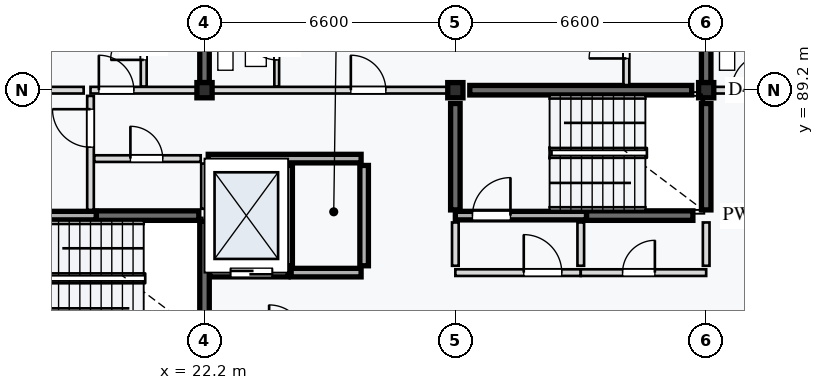
"""IFC4 building model, lengths in metres.
Left out: names, types, materials, properties, quantities, classifications, styles, units other than length and angle.
Written with IfcOpenShell. Run it as: python <this file> out.ifc"""

import sys

from ifc_helpers import new_model, si_unit, direction, frame, frame_2d, origin, origin_2d, place, context, subcontext, project, spatial, rectangle, extrude, element, fill, save


model = new_model("IFC4")
c1 = context("Model", 3, precision=1e-05, world=origin(), true_north=direction((0.0, 1.0)))
c2 = subcontext(c1, "Body", "Model", "MODEL_VIEW")
j1 = project(units=[si_unit("LENGTHUNIT", "METRE"), si_unit("PLANEANGLEUNIT", "RADIAN")], contexts=[c1])
p1 = place(None, origin())
s1 = spatial("IfcSite", under=j1, at=p1, CompositionType="ELEMENT")
p2 = place(p1, origin())
s2 = spatial("IfcBuilding", under=s1, at=p2, CompositionType="ELEMENT")
p3 = place(p2, frame((0.0, 0.0, 46.8)))
s3 = spatial("IfcBuildingStorey", under=s2, at=p3, CompositionType="ELEMENT", Elevation=46.8)
for number, where, z_axis, x_axis in (
    (1, (22.2, 89.2, 0.0), (0.0, 0.0, 1.0), (1.0, 0.0, 0.0)),
    (2, (28.8, 89.2, 0.0), (0.0, 0.0, 1.0), (1.0, 0.0, 0.0)),
    (3, (35.4, 89.2, 0.0), (0.0, 0.0, 1.0), (1.0, 0.0, 0.0)),
):
    element("IfcColumn", number, at=place(p3, frame(where, z_axis=z_axis, x_axis=x_axis)), inside=s3, PredefinedType="COLUMN", context=c2, shape_type="SweptSolid", body=[
        extrude(rectangle(XDim=0.4, YDim=0.4, at=origin_2d()), origin(), (0.0, 0.0, 1.0), 3.2),
    ])
p4 = place(p3, frame((19.35, 85.9, 0.0), z_axis=(0.0, 0.0, 1.0), x_axis=(1.0, 0.0, 0.0)))
e4 = element("IfcWall", 4, at=p4, inside=s3, PredefinedType="SHEAR", context=c2, shape_type="SweptSolid", body=[
    extrude(rectangle(XDim=2.7, YDim=0.25, at=frame_2d((1.35, 0.0))), origin(), (0.0, 0.0, 1.0), 2.98),
])
p5 = place(p3, frame((22.2, 82.95, 0.0), z_axis=(0.0, 0.0, 1.0), x_axis=(0.0, 1.0, 0.0)))
e5 = element("IfcWall", 5, at=p5, inside=s3, PredefinedType="SHEAR", context=c2, shape_type="SweptSolid", body=[
    extrude(rectangle(XDim=2.8, YDim=0.25, at=frame_2d((1.4, 0.0))), origin(), (0.0, 0.0, 1.0), 2.98),
])
p6 = place(p3, frame((29.18, 89.2, 0.0), z_axis=(0.0, 0.0, 1.0), x_axis=(1.0, 0.0, 0.0)))
e6 = element("IfcWall", 6, at=p6, inside=s3, PredefinedType="SHEAR", context=c2, shape_type="SweptSolid", body=[
    extrude(rectangle(XDim=5.84, YDim=0.25, at=frame_2d((2.92, 0.0))), origin(), (0.0, 0.0, 1.0), 2.98),
])
for number, where, z_axis, x_axis in (
    (7, (32.25, 85.9, 0.0), (0.0, 0.0, 1.0), (1.0, 0.0, 0.0)),
    (8, (28.8, 86.05, 0.0), (0.0, 0.0, 1.0), (0.0, 1.0, 0.0)),
    (9, (35.4, 86.05, 0.0), (0.0, 0.0, 1.0), (0.0, 1.0, 0.0)),
):
    element("IfcWall", number, at=place(p3, frame(where, z_axis=z_axis, x_axis=x_axis)), inside=s3, PredefinedType="SHEAR", context=c2, shape_type="SweptSolid", body=[
        extrude(rectangle(XDim=2.8, YDim=0.25, at=frame_2d((1.4, 0.0))), origin(), (0.0, 0.0, 1.0), 2.98),
    ])
for number, where, z_axis, x_axis in (
    (10, (22.2, 89.4, 0.0), (0.0, 0.0, 1.0), (0.0, 1.0, 0.0)),
    (11, (35.4, 89.4, 0.0), (0.0, 0.0, 1.0), (0.0, 1.0, 0.0)),
):
    element("IfcWall", number, at=place(p3, frame(where, z_axis=z_axis, x_axis=x_axis)), inside=s3, PredefinedType="SHEAR", context=c2, shape_type="SweptSolid", body=[
        extrude(rectangle(XDim=6.2, YDim=0.25, at=frame_2d((3.1, 0.0))), origin(), (0.0, 0.0, 1.0), 2.98),
    ])
p7 = place(p3, frame((15.75, 85.9, 0.0), z_axis=(0.0, 0.0, 1.0), x_axis=(1.0, 0.0, 0.0)))
e12 = element("IfcWall", 12, at=p7, inside=s3, PredefinedType="STANDARD", context=c2, shape_type="SweptSolid", body=[
    extrude(rectangle(XDim=3.6, YDim=0.225, at=frame_2d((1.8, 0.0))), origin(), (0.0, 0.0, 1.0), 2.98),
])
p8 = place(p7, frame((0.45, 0.0, 0.0)))
e13 = element("IfcOpeningElement", 13, at=p8, cuts=e12, PredefinedType="OPENING", context=c2, shape_type="SweptSolid", body=[
    extrude(rectangle(XDim=1.04, YDim=2.12, at=frame_2d((0.52, 1.06))), frame((0.0, 0.123, 0.0), z_axis=(0.0, -1.0, 0.0), x_axis=(1.0, 0.0, 0.0)), (0.0, 0.0, 1.0), 0.245),
])
p9 = place(p3, frame((19.2, 86.05, 0.0), z_axis=(0.0, 0.0, 1.0), x_axis=(0.0, 1.0, 0.0)))
e14 = element("IfcWall", 14, at=p9, inside=s3, PredefinedType="PARTITIONING", context=c2, shape_type="SweptSolid", body=[
    extrude(rectangle(XDim=3.0, YDim=0.175, at=frame_2d((1.5, 0.0))), origin(), (0.0, 0.0, 1.0), 2.98),
])
p10 = place(p9, frame((1.65, 0.0, 0.0)))
e15 = element("IfcOpeningElement", 15, at=p10, cuts=e14, PredefinedType="OPENING", context=c2, shape_type="SweptSolid", body=[
    extrude(rectangle(XDim=1.0, YDim=2.1, at=frame_2d((0.5, 1.05))), frame((0.0, 0.097, 0.0), z_axis=(0.0, -1.0, 0.0), x_axis=(1.0, 0.0, 0.0)), (0.0, 0.0, 1.0), 0.195),
])
p11 = place(p3, frame((19.3, 87.4, 0.0), z_axis=(0.0, 0.0, 1.0), x_axis=(1.0, 0.0, 0.0)))
e16 = element("IfcWall", 16, at=p11, inside=s3, PredefinedType="PARTITIONING", context=c2, shape_type="SweptSolid", body=[
    extrude(rectangle(XDim=2.8, YDim=0.175, at=frame_2d((1.4, 0.0))), origin(), (0.0, 0.0, 1.0), 2.98),
])
p12 = place(p11, frame((0.95, 0.0, 0.0)))
e17 = element("IfcOpeningElement", 17, at=p12, cuts=e16, PredefinedType="OPENING", context=c2, shape_type="SweptSolid", body=[
    extrude(rectangle(XDim=0.85, YDim=2.0, at=frame_2d((0.425, 1.0))), frame((0.0, 0.097, 0.0), z_axis=(0.0, -1.0, 0.0), x_axis=(1.0, 0.0, 0.0)), (0.0, 0.0, 1.0), 0.195),
])
p13 = place(p3, frame((22.2, 86.08, 0.0), z_axis=(0.0, 0.0, 1.0), x_axis=(0.0, 1.0, 0.0)))
e18 = element("IfcWall", 18, at=p13, inside=s3, PredefinedType="PARTITIONING", context=c2, shape_type="SweptSolid", body=[
    extrude(rectangle(XDim=1.19, YDim=0.175, at=frame_2d((0.595, 0.0))), origin(), (0.0, 0.0, 1.0), 2.98),
])
p14 = place(p3, frame((22.335, 84.4, 0.0), z_axis=(0.0, 0.0, 1.0), x_axis=(1.0, 0.0, 0.0)))
e19 = element("IfcWall", 19, at=p14, inside=s3, PredefinedType="STANDARD", context=c2, shape_type="SweptSolid", body=[
    extrude(rectangle(XDim=2.065, YDim=0.225, at=frame_2d((1.032, 0.0))), origin(), (0.0, 0.0, 1.0), 2.98),
])
p15 = place(p14, frame((0.55, 0.0, 0.0)))
e20 = element("IfcOpeningElement", 20, at=p15, cuts=e19, PredefinedType="OPENING", context=c2, shape_type="SweptSolid", body=[
    extrude(rectangle(XDim=1.1, YDim=2.1, at=frame_2d((0.55, 1.05))), frame((0.0, 0.123, 0.0), z_axis=(0.0, -1.0, 0.0), x_axis=(1.0, 0.0, 0.0)), (0.0, 0.0, 1.0), 0.245),
])
p16 = place(p3, frame((24.48, 84.4, 0.0), z_axis=(0.0, 0.0, 1.0), x_axis=(1.0, 0.0, 0.0)))
e21 = element("IfcWall", 21, at=p16, inside=s3, PredefinedType="STANDARD", context=c2, shape_type="SweptSolid", body=[
    extrude(rectangle(XDim=1.84, YDim=0.225, at=frame_2d((0.92, 0.0))), origin(), (0.0, 0.0, 1.0), 2.98),
])
p17 = place(p3, frame((22.298, 87.4, 0.0), z_axis=(0.0, 0.0, 1.0), x_axis=(1.0, 0.0, 0.0)))
e22 = element("IfcWall", 22, at=p17, inside=s3, PredefinedType="STANDARD", context=c2, shape_type="SweptSolid", body=[
    extrude(rectangle(XDim=4.022, YDim=0.225, at=frame_2d((2.011, 0.0))), origin(), (0.0, 0.0, 1.0), 2.98),
])
for number, where, z_axis, x_axis in (
    (23, (24.4, 84.58, 0.0), (0.0, 0.0, 1.0), (0.0, 1.0, 0.0)),
    (24, (26.4, 84.58, 0.0), (0.0, 0.0, 1.0), (0.0, 1.0, 0.0)),
):
    element("IfcWall", number, at=place(p3, frame(where, z_axis=z_axis, x_axis=x_axis)), inside=s3, PredefinedType="STANDARD", context=c2, shape_type="SweptSolid", body=[
        extrude(rectangle(XDim=2.64, YDim=0.225, at=frame_2d((1.32, 0.0))), origin(), (0.0, 0.0, 1.0), 2.98),
    ])
p18 = place(p3, frame((28.8, 85.9, 0.0), z_axis=(0.0, 0.0, 1.0), x_axis=(1.0, 0.0, 0.0)))
e25 = element("IfcWall", 25, at=p18, inside=s3, PredefinedType="STANDARD", context=c2, shape_type="SweptSolid", body=[
    extrude(rectangle(XDim=3.45, YDim=0.225, at=frame_2d((1.725, 0.0))), origin(), (0.0, 0.0, 1.0), 2.98),
])
p19 = place(p18, frame((0.45, 0.0, 0.0)))
e26 = element("IfcOpeningElement", 26, at=p19, cuts=e25, PredefinedType="OPENING", context=c2, shape_type="SweptSolid", body=[
    extrude(rectangle(XDim=1.0, YDim=2.1, at=frame_2d((0.5, 1.05))), frame((0.0, 0.123, 0.0), z_axis=(0.0, -1.0, 0.0), x_axis=(1.0, 0.0, 0.0)), (0.0, 0.0, 1.0), 0.245),
])
p20 = place(p3, frame((28.8, 84.4, 0.0), z_axis=(0.0, 0.0, 1.0), x_axis=(1.0, 0.0, 0.0)))
e27 = element("IfcWall", 27, at=p20, inside=s3, PredefinedType="PARTITIONING", context=c2, shape_type="SweptSolid", body=[
    extrude(rectangle(XDim=3.3, YDim=0.175, at=frame_2d((1.65, 0.0))), origin(), (0.0, 0.0, 1.0), 2.98),
])
p21 = place(p20, frame((1.8, 0.0, 0.0)))
e28 = element("IfcOpeningElement", 28, at=p21, cuts=e27, PredefinedType="OPENING", context=c2, shape_type="SweptSolid", body=[
    extrude(rectangle(XDim=1.0, YDim=2.16, at=frame_2d((0.5, 1.08))), frame((0.0, 0.097, 0.0), z_axis=(0.0, -1.0, 0.0), x_axis=(1.0, 0.0, 0.0)), (0.0, 0.0, 1.0), 0.195),
])
p22 = place(p3, frame((32.1, 84.4, 0.0), z_axis=(0.0, 0.0, 1.0), x_axis=(1.0, 0.0, 0.0)))
e29 = element("IfcWall", 29, at=p22, inside=s3, PredefinedType="PARTITIONING", context=c2, shape_type="SweptSolid", body=[
    extrude(rectangle(XDim=3.3, YDim=0.175, at=frame_2d((1.65, 0.0))), origin(), (0.0, 0.0, 1.0), 2.98),
])
p23 = place(p22, frame((1.1, 0.0, 0.0)))
e30 = element("IfcOpeningElement", 30, at=p23, cuts=e29, PredefinedType="OPENING", context=c2, shape_type="SweptSolid", body=[
    extrude(rectangle(XDim=0.85, YDim=2.0, at=frame_2d((0.425, 1.0))), frame((0.0, 0.097, 0.0), z_axis=(0.0, -1.0, 0.0), x_axis=(1.0, 0.0, 0.0)), (0.0, 0.0, 1.0), 0.195),
])
for number, where, z_axis, x_axis in (
    (31, (28.8, 84.58, 0.0), (0.0, 0.0, 1.0), (0.0, 1.0, 0.0)),
    (32, (32.1, 84.58, 0.0), (0.0, 0.0, 1.0), (0.0, 1.0, 0.0)),
    (33, (35.4, 84.58, 0.0), (0.0, 0.0, 1.0), (0.0, 1.0, 0.0)),
):
    element("IfcWall", number, at=place(p3, frame(where, z_axis=z_axis, x_axis=x_axis)), inside=s3, PredefinedType="PARTITIONING", context=c2, shape_type="SweptSolid", body=[
        extrude(rectangle(XDim=1.14, YDim=0.175, at=frame_2d((0.57, 0.0))), origin(), (0.0, 0.0, 1.0), 2.98),
    ])
p24 = place(p3, frame((15.88, 89.2, 0.0), z_axis=(0.0, 0.0, 1.0), x_axis=(1.0, 0.0, 0.0)))
e34 = element("IfcWall", 34, at=p24, inside=s3, PredefinedType="PARTITIONING", context=c2, shape_type="SweptSolid", body=[
    extrude(rectangle(XDim=3.14, YDim=0.175, at=frame_2d((1.57, 0.0))), origin(), (0.0, 0.0, 1.0), 2.55),
])
p25 = place(p3, frame((19.2, 89.2, 0.0), z_axis=(0.0, 0.0, 1.0), x_axis=(1.0, 0.0, 0.0)))
e35 = element("IfcWall", 35, at=p25, inside=s3, PredefinedType="PARTITIONING", context=c2, shape_type="SweptSolid", body=[
    extrude(rectangle(XDim=3.0, YDim=0.175, at=frame_2d((1.5, 0.0))), origin(), (0.0, 0.0, 1.0), 2.55),
])
p26 = place(p25, frame((0.22, 0.0, 0.0)))
e36 = element("IfcOpeningElement", 36, at=p26, cuts=e35, PredefinedType="OPENING", context=c2, shape_type="SweptSolid", body=[
    extrude(rectangle(XDim=0.92, YDim=2.14, at=frame_2d((0.46, 1.07))), frame((0.0, 0.097, 0.0), z_axis=(0.0, -1.0, 0.0), x_axis=(1.0, 0.0, 0.0)), (0.0, 0.0, 1.0), 0.195),
])
p27 = place(p3, frame((20.6, 89.298, 0.0), z_axis=(0.0, 0.0, 1.0), x_axis=(0.0, 1.0, 0.0)))
e37 = element("IfcWall", 37, at=p27, inside=s3, PredefinedType="PARTITIONING", context=c2, shape_type="SweptSolid", body=[
    extrude(rectangle(XDim=2.302, YDim=0.155, at=frame_2d((1.151, 0.0))), origin(), (0.0, 0.0, 1.0), 2.98),
])
p28 = place(p27, frame((0.7, 0.0, 0.0)))
e38 = element("IfcOpeningElement", 38, at=p28, cuts=e37, PredefinedType="OPENING", context=c2, shape_type="SweptSolid", body=[
    extrude(rectangle(XDim=0.87, YDim=2.08, at=frame_2d((0.435, 1.04))), frame((0.0, 0.087, 0.0), z_axis=(0.0, -1.0, 0.0), x_axis=(1.0, 0.0, 0.0)), (0.0, 0.0, 1.0), 0.175),
])
p29 = place(p3, frame((22.2, 89.2, 0.0), z_axis=(0.0, 0.0, 1.0), x_axis=(1.0, 0.0, 0.0)))
e39 = element("IfcWall", 39, at=p29, inside=s3, PredefinedType="PARTITIONING", context=c2, shape_type="SweptSolid", body=[
    extrude(rectangle(XDim=6.6, YDim=0.175, at=frame_2d((3.3, 0.0))), origin(), (0.0, 0.0, 1.0), 2.55),
])
p30 = place(p29, frame((3.85, 0.0, 0.0)))
e40 = element("IfcOpeningElement", 40, at=p30, cuts=e39, PredefinedType="OPENING", context=c2, shape_type="SweptSolid", body=[
    extrude(rectangle(XDim=0.92, YDim=2.14, at=frame_2d((0.46, 1.07))), frame((0.0, 0.097, 0.0), z_axis=(0.0, -1.0, 0.0), x_axis=(1.0, 0.0, 0.0)), (0.0, 0.0, 1.0), 0.195),
])
p31 = place(p3, frame((24.1, 89.298, 0.0), z_axis=(0.0, 0.0, 1.0), x_axis=(0.0, 1.0, 0.0)))
e41 = element("IfcWall", 41, at=p31, inside=s3, PredefinedType="PARTITIONING", context=c2, shape_type="SweptSolid", body=[
    extrude(rectangle(XDim=2.302, YDim=0.125, at=frame_2d((1.151, 0.0))), origin(), (0.0, 0.0, 1.0), 2.98),
])
p32 = place(p31, frame((0.7, 0.0, 0.0)))
e42 = element("IfcOpeningElement", 42, at=p32, cuts=e41, PredefinedType="OPENING", context=c2, shape_type="SweptSolid", body=[
    extrude(rectangle(XDim=0.82, YDim=2.05, at=frame_2d((0.41, 1.025))), frame((0.0, 0.073, 0.0), z_axis=(0.0, -1.0, 0.0), x_axis=(1.0, 0.0, 0.0)), (0.0, 0.0, 1.0), 0.145),
])
p33 = place(p3, frame((33.3, 89.335, 0.0), z_axis=(0.0, 0.0, 1.0), x_axis=(0.0, 1.0, 0.0)))
e43 = element("IfcWall", 43, at=p33, inside=s3, PredefinedType="PARTITIONING", context=c2, shape_type="SweptSolid", body=[
    extrude(rectangle(XDim=2.265, YDim=0.155, at=frame_2d((1.133, 0.0))), origin(), (0.0, 0.0, 1.0), 2.98),
])
p34 = place(p33, frame((0.7, 0.0, 0.0)))
e44 = element("IfcOpeningElement", 44, at=p34, cuts=e43, PredefinedType="OPENING", context=c2, shape_type="SweptSolid", body=[
    extrude(rectangle(XDim=0.98, YDim=2.12, at=frame_2d((0.49, 1.06))), frame((0.0, 0.087, 0.0), z_axis=(0.0, -1.0, 0.0), x_axis=(1.0, 0.0, 0.0)), (0.0, 0.0, 1.0), 0.175),
])
p35 = place(p3, frame((35.4, 89.2, 0.0), z_axis=(0.0, 0.0, 1.0), x_axis=(1.0, 0.0, 0.0)))
e45 = element("IfcWall", 45, at=p35, inside=s3, PredefinedType="PARTITIONING", context=c2, shape_type="SweptSolid", body=[
    extrude(rectangle(XDim=13.2, YDim=0.175, at=frame_2d((6.6, 0.0))), origin(), (0.0, 0.0, 1.0), 2.55),
])
p36 = place(p35, frame((0.67, 0.0, 0.0)))
e46 = element("IfcOpeningElement", 46, at=p36, cuts=e45, PredefinedType="OPENING", context=c2, shape_type="SweptSolid", body=[
    extrude(rectangle(XDim=0.96, YDim=2.18, at=frame_2d((0.48, 1.09))), frame((0.0, 0.097, 0.0), z_axis=(0.0, -1.0, 0.0), x_axis=(1.0, 0.0, 0.0)), (0.0, 0.0, 1.0), 0.195),
])
p37 = place(p10, origin())
e47 = element("IfcDoor", 47, at=p37, inside=s3, OperationType="SINGLE_SWING_RIGHT", PredefinedType="DOOR", context=c2, shape_type="SweptSolid", body=[
    extrude(rectangle(XDim=1.0, YDim=2.1, at=frame_2d((0.5, 1.05))), frame((0.0, 0.025, 0.0), z_axis=(0.0, -1.0, 0.0), x_axis=(1.0, 0.0, 0.0)), (0.0, 0.0, 1.0), 0.05),
])
fill(e15, e47)
p38 = place(p12, origin())
e48 = element("IfcDoor", 48, at=p38, inside=s3, OperationType="SINGLE_SWING_LEFT", PredefinedType="DOOR", context=c2, shape_type="SweptSolid", body=[
    extrude(rectangle(XDim=0.85, YDim=2.0, at=frame_2d((0.425, 1.0))), frame((0.0, 0.025, 0.0), z_axis=(0.0, -1.0, 0.0), x_axis=(1.0, 0.0, 0.0)), (0.0, 0.0, 1.0), 0.05),
])
fill(e17, e48)
p39 = place(p15, origin())
e49 = element("IfcDoor", 49, at=p39, inside=s3, OperationType="DOUBLE_DOOR_SLIDING", PredefinedType="DOOR", context=c2, shape_type="SweptSolid", body=[
    extrude(rectangle(XDim=1.1, YDim=2.1, at=frame_2d((0.55, 1.05))), frame((0.0, 0.025, 0.0), z_axis=(0.0, -1.0, 0.0), x_axis=(1.0, 0.0, 0.0)), (0.0, 0.0, 1.0), 0.05),
])
fill(e20, e49)
p40 = place(p19, origin())
e50 = element("IfcDoor", 50, at=p40, inside=s3, OperationType="SINGLE_SWING_RIGHT", PredefinedType="DOOR", context=c2, shape_type="SweptSolid", body=[
    extrude(rectangle(XDim=1.0, YDim=2.1, at=frame_2d((0.5, 1.05))), frame((0.0, 0.025, 0.0), z_axis=(0.0, -1.0, 0.0), x_axis=(1.0, 0.0, 0.0)), (0.0, 0.0, 1.0), 0.05),
])
fill(e26, e50)
p41 = place(p21, origin())
e51 = element("IfcDoor", 51, at=p41, inside=s3, OperationType="SINGLE_SWING_LEFT", PredefinedType="DOOR", context=c2, shape_type="SweptSolid", body=[
    extrude(rectangle(XDim=1.0, YDim=2.16, at=frame_2d((0.5, 1.08))), frame((0.0, 0.025, 0.0), z_axis=(0.0, -1.0, 0.0), x_axis=(1.0, 0.0, 0.0)), (0.0, 0.0, 1.0), 0.05),
])
fill(e28, e51)
p42 = place(p23, origin())
e52 = element("IfcDoor", 52, at=p42, inside=s3, OperationType="SINGLE_SWING_RIGHT", PredefinedType="DOOR", context=c2, shape_type="SweptSolid", body=[
    extrude(rectangle(XDim=0.85, YDim=2.0, at=frame_2d((0.425, 1.0))), frame((0.0, 0.025, 0.0), z_axis=(0.0, -1.0, 0.0), x_axis=(1.0, 0.0, 0.0)), (0.0, 0.0, 1.0), 0.05),
])
fill(e30, e52)
p43 = place(p26, origin())
e53 = element("IfcDoor", 53, at=p43, inside=s3, OperationType="SINGLE_SWING_LEFT", PredefinedType="DOOR", context=c2, shape_type="SweptSolid", body=[
    extrude(rectangle(XDim=0.92, YDim=2.14, at=frame_2d((0.46, 1.07))), frame((0.0, 0.025, 0.0), z_axis=(0.0, -1.0, 0.0), x_axis=(1.0, 0.0, 0.0)), (0.0, 0.0, 1.0), 0.05),
])
fill(e36, e53)
p44 = place(p28, origin())
e54 = element("IfcDoor", 54, at=p44, inside=s3, OperationType="SINGLE_SWING_LEFT", PredefinedType="DOOR", context=c2, shape_type="SweptSolid", body=[
    extrude(rectangle(XDim=0.87, YDim=2.08, at=frame_2d((0.435, 1.04))), frame((0.0, 0.025, 0.0), z_axis=(0.0, -1.0, 0.0), x_axis=(1.0, 0.0, 0.0)), (0.0, 0.0, 1.0), 0.05),
])
fill(e38, e54)
p45 = place(p30, origin())
e55 = element("IfcDoor", 55, at=p45, inside=s3, OperationType="SINGLE_SWING_LEFT", PredefinedType="DOOR", context=c2, shape_type="SweptSolid", body=[
    extrude(rectangle(XDim=0.92, YDim=2.14, at=frame_2d((0.46, 1.07))), frame((0.0, 0.025, 0.0), z_axis=(0.0, -1.0, 0.0), x_axis=(1.0, 0.0, 0.0)), (0.0, 0.0, 1.0), 0.05),
])
fill(e40, e55)
p46 = place(p32, origin())
e56 = element("IfcDoor", 56, at=p46, inside=s3, OperationType="SINGLE_SWING_RIGHT", PredefinedType="DOOR", context=c2, shape_type="SweptSolid", body=[
    extrude(rectangle(XDim=0.82, YDim=2.05, at=frame_2d((0.41, 1.025))), frame((0.0, 0.025, 0.0), z_axis=(0.0, -1.0, 0.0), x_axis=(1.0, 0.0, 0.0)), (0.0, 0.0, 1.0), 0.05),
])
fill(e42, e56)
p47 = place(p34, origin())
e57 = element("IfcDoor", 57, at=p47, inside=s3, OperationType="SINGLE_SWING_LEFT", PredefinedType="DOOR", context=c2, shape_type="SweptSolid", body=[
    extrude(rectangle(XDim=0.98, YDim=2.12, at=frame_2d((0.49, 1.06))), frame((0.0, 0.025, 0.0), z_axis=(0.0, -1.0, 0.0), x_axis=(1.0, 0.0, 0.0)), (0.0, 0.0, 1.0), 0.05),
])
fill(e44, e57)
p48 = place(p36, origin())
e58 = element("IfcDoor", 58, at=p48, inside=s3, OperationType="SINGLE_SWING_RIGHT", PredefinedType="DOOR", context=c2, shape_type="SweptSolid", body=[
    extrude(rectangle(XDim=0.96, YDim=2.18, at=frame_2d((0.48, 1.09))), frame((0.0, 0.025, 0.0), z_axis=(0.0, -1.0, 0.0), x_axis=(1.0, 0.0, 0.0)), (0.0, 0.0, 1.0), 0.05),
])
fill(e46, e58)
save(model, sys.argv[1])
